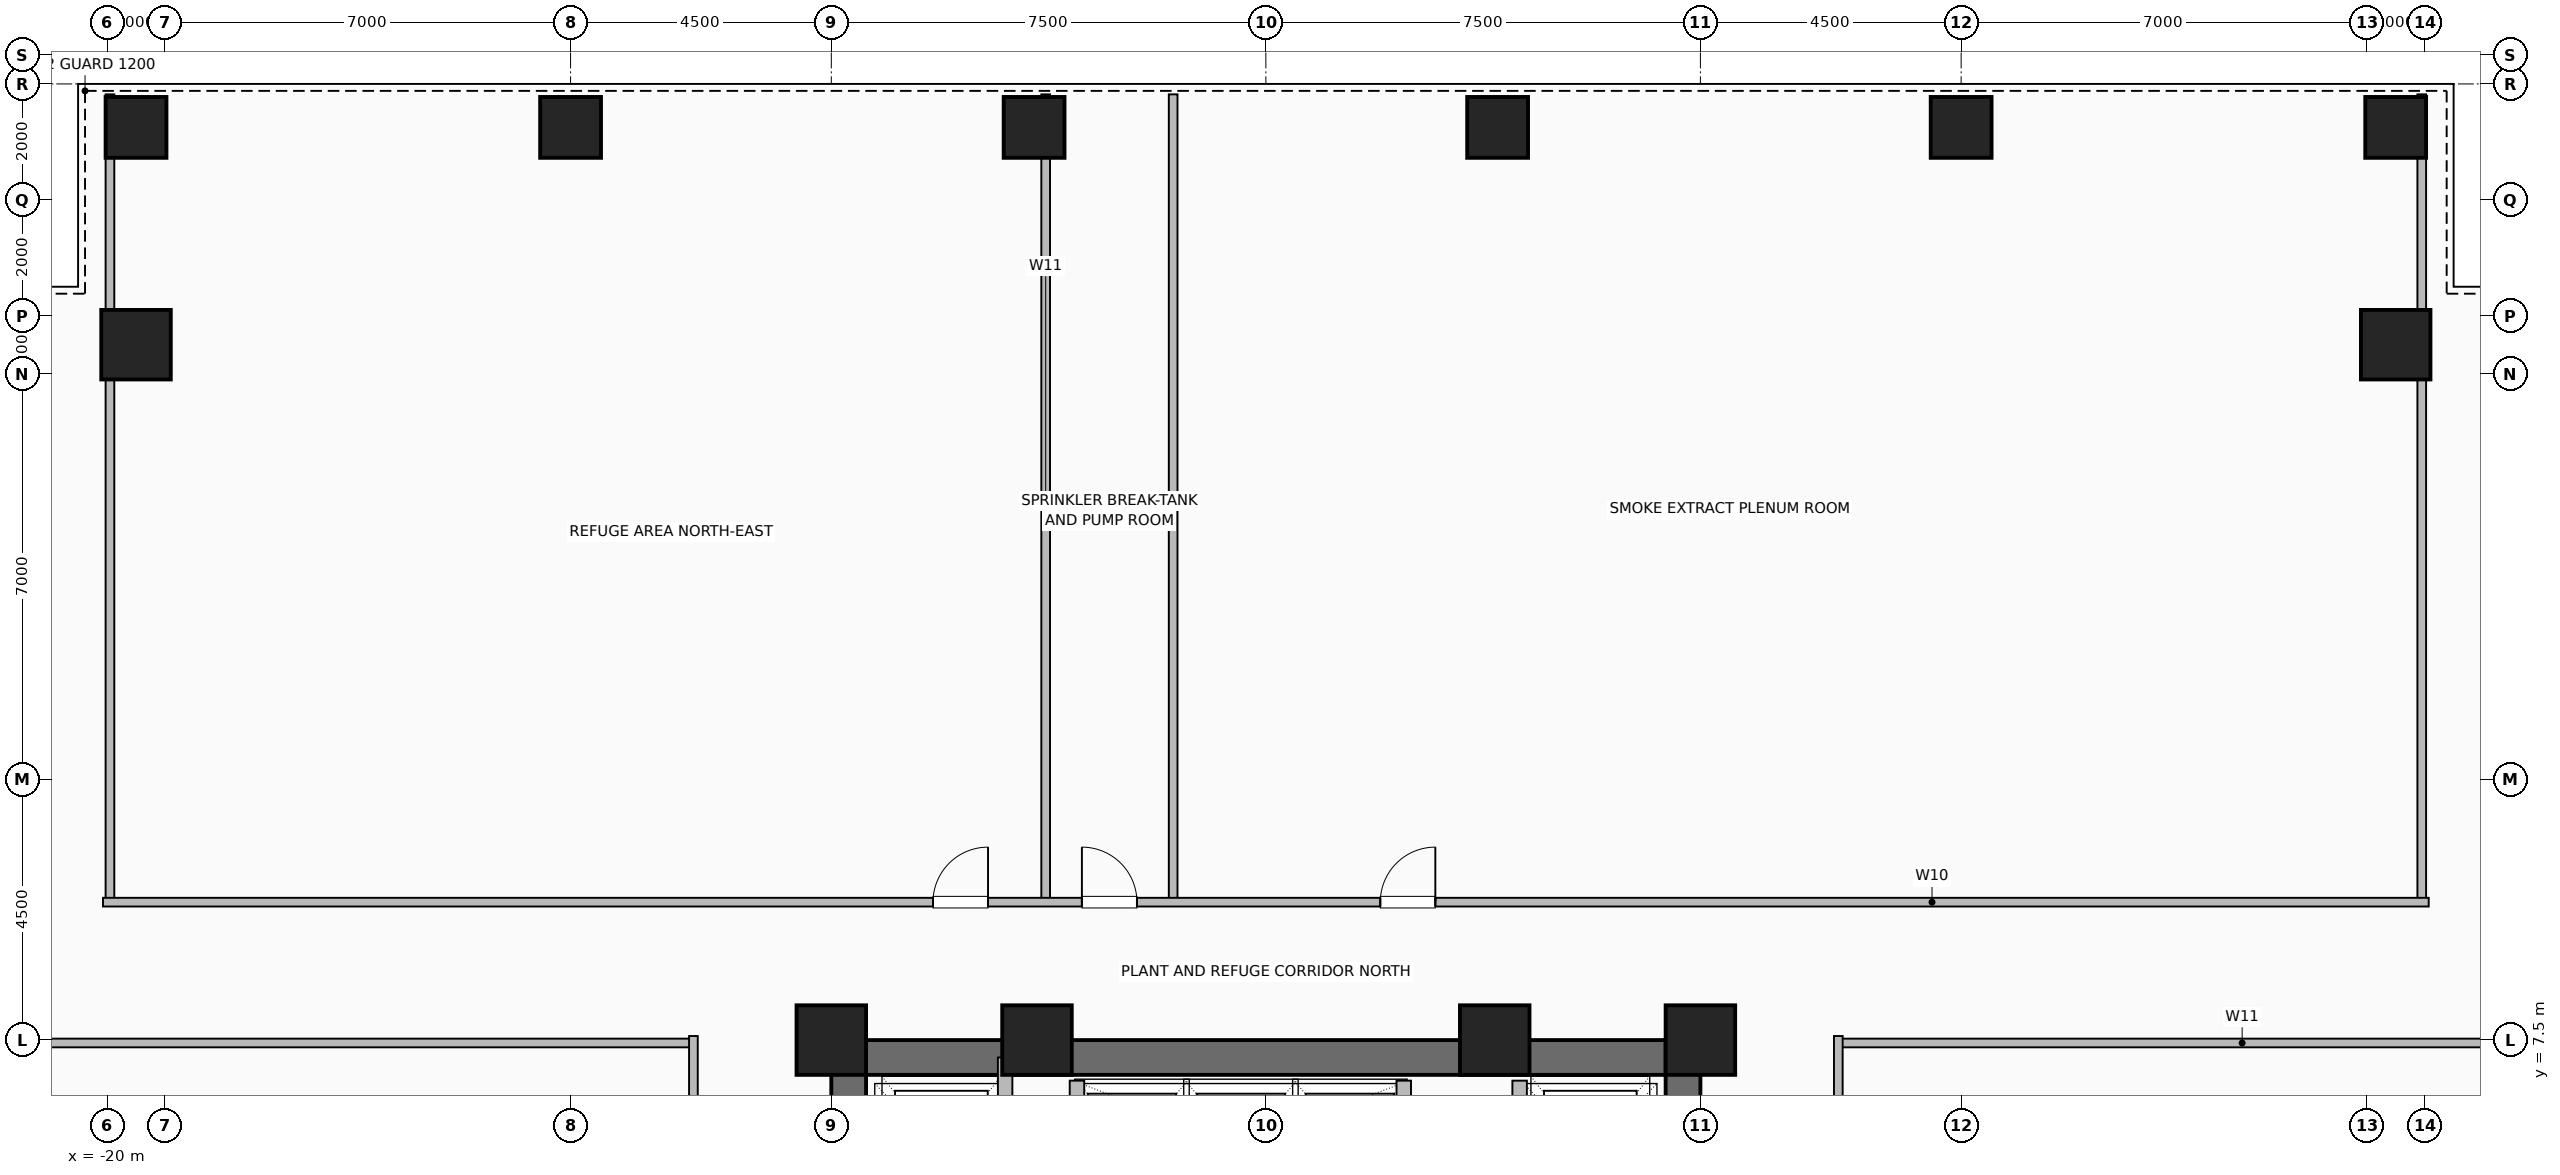
"""IFC4 building model, lengths in metres.
Left out: names, types, materials, properties, quantities, classifications, styles, units other than length and angle.
Written with IfcOpenShell. Run it as: python <this file> out.ifc"""

import sys

from ifc_helpers import new_model, si_unit, direction, frame, frame_2d, origin, origin_2d, place, context, subcontext, project, spatial, rectangle, hollow_rectangle, extrude, element, fill, save


model = new_model("IFC4")
c1 = context("Model", 3, precision=1e-05, world=origin(), true_north=direction((0.0, 1.0)))
c2 = subcontext(c1, "Body", "Model", "MODEL_VIEW")
j1 = project(units=[si_unit("LENGTHUNIT", "METRE"), si_unit("PLANEANGLEUNIT", "RADIAN")], contexts=[c1])
p1 = place(None, origin())
s1 = spatial("IfcSite", under=j1, at=p1, CompositionType="ELEMENT")
p2 = place(p1, origin())
s2 = spatial("IfcBuilding", under=s1, at=p2, CompositionType="ELEMENT")
p3 = place(p2, frame((0.0, 0.0, 88.0)))
s3 = spatial("IfcBuildingStorey", under=s2, at=p3, CompositionType="ELEMENT", Elevation=88.0)
for number, where, z_axis, x_axis in (
    (1, (7.5, 7.5, 0.0), (0.0, 0.0, 1.0), (1.0, 0.0, 0.0)),
    (2, (3.95, 7.5, 0.0), (0.0, 0.0, 1.0), (1.0, 0.0, 0.0)),
    (3, (-3.95, 7.5, 0.0), (0.0, 0.0, 1.0), (1.0, 0.0, 0.0)),
    (4, (-7.5, 7.5, 0.0), (0.0, 0.0, 1.0), (1.0, 0.0, 0.0)),
):
    element("IfcColumn", number, at=place(p3, frame(where, z_axis=z_axis, x_axis=x_axis)), inside=s3, PredefinedType="COLUMN", context=c2, shape_type="SweptSolid", body=[
        extrude(hollow_rectangle(XDim=1.2, YDim=1.2, WallThickness=0.055, at=origin_2d()), origin(), (0.0, 0.0, 1.0), 6.0),
    ])
for number, where, z_axis, x_axis in (
    (5, (-19.5, 23.25, 0.0), (0.0, 0.0, 1.0), (1.0, 0.0, 0.0)),
    (6, (-12.0, 23.25, 0.0), (0.0, 0.0, 1.0), (1.0, 0.0, 0.0)),
    (7, (-4.0, 23.25, 0.0), (0.0, 0.0, 1.0), (1.0, 0.0, 0.0)),
    (8, (4.0, 23.25, 0.0), (0.0, 0.0, 1.0), (1.0, 0.0, 0.0)),
    (9, (12.0, 23.25, 0.0), (0.0, 0.0, 1.0), (1.0, 0.0, 0.0)),
    (10, (19.5, 23.25, 0.0), (0.0, 0.0, 1.0), (1.0, 0.0, 0.0)),
):
    element("IfcColumn", number, at=place(p3, frame(where, z_axis=z_axis, x_axis=x_axis)), inside=s3, PredefinedType="COLUMN", context=c2, shape_type="SweptSolid", body=[
        extrude(hollow_rectangle(XDim=1.05, YDim=1.05, WallThickness=0.05, at=origin_2d()), origin(), (0.0, 0.0, 1.0), 5.6),
    ])
for number, where, z_axis, x_axis in (
    (11, (19.5, 19.5, 0.0), (0.0, 0.0, 1.0), (1.0, 0.0, 0.0)),
    (12, (-19.5, 19.5, 0.0), (0.0, 0.0, 1.0), (1.0, 0.0, 0.0)),
):
    element("IfcColumn", number, at=place(p3, frame(where, z_axis=z_axis, x_axis=x_axis)), inside=s3, PredefinedType="COLUMN", context=c2, shape_type="SweptSolid", body=[
        extrude(hollow_rectangle(XDim=1.2, YDim=1.2, WallThickness=0.055, at=origin_2d()), origin(), (0.0, 0.0, 1.0), 5.6),
    ])
p4 = place(p3, frame((-7.5, 7.2, 0.0), z_axis=(0.0, 0.0, 1.0), x_axis=(1.0, 0.0, 0.0)))
e13 = element("IfcWall", 13, at=p4, inside=s3, PredefinedType="SHEAR", context=c2, shape_type="SweptSolid", body=[
    extrude(rectangle(XDim=15.0, YDim=0.6, at=frame_2d((7.5, 0.0))), origin(), (0.0, 0.0, 1.0), 5.6),
])
p5 = place(p3, frame((-7.2, -7.5, 0.0), z_axis=(0.0, 0.0, 1.0), x_axis=(0.0, 1.0, 0.0)))
e14 = element("IfcWall", 14, at=p5, inside=s3, PredefinedType="SHEAR", context=c2, shape_type="SweptSolid", body=[
    extrude(rectangle(XDim=15.0, YDim=0.6, at=frame_2d((7.5, 0.0))), origin(), (0.0, 0.0, 1.0), 5.6),
])
p6 = place(p5, frame((9.5, 0.0, 0.0)))
e15 = element("IfcOpeningElement", 15, at=p6, cuts=e14, PredefinedType="OPENING", context=c2, shape_type="SweptSolid", body=[
    extrude(rectangle(XDim=1.0, YDim=2.08, at=frame_2d((0.5, 1.04))), frame((0.0, 0.31, 0.0), z_axis=(0.0, -1.0, 0.0), x_axis=(1.0, 0.0, 0.0)), (0.0, 0.0, 1.0), 0.62),
])
p7 = place(p3, frame((7.2, -7.5, 0.0), z_axis=(0.0, 0.0, 1.0), x_axis=(0.0, 1.0, 0.0)))
e16 = element("IfcWall", 16, at=p7, inside=s3, PredefinedType="SHEAR", context=c2, shape_type="SweptSolid", body=[
    extrude(rectangle(XDim=15.0, YDim=0.6, at=frame_2d((7.5, 0.0))), origin(), (0.0, 0.0, 1.0), 5.6),
])
for number, where, z_axis, x_axis in (
    (17, (-3.26, 4.58, 0.0), (0.0, 0.0, 1.0), (0.0, 1.0, 0.0)),
    (18, (2.38, 4.58, 0.0), (0.0, 0.0, 1.0), (0.0, 1.0, 0.0)),
):
    element("IfcWall", number, at=place(p3, frame(where, z_axis=z_axis, x_axis=x_axis)), inside=s3, PredefinedType="SHEAR", context=c2, shape_type="SweptSolid", body=[
        extrude(rectangle(XDim=2.22, YDim=0.25, at=frame_2d((1.11, 0.0))), origin(), (0.0, 0.0, 1.0), 5.6),
    ])
p8 = place(p3, frame((-4.5, 4.35, 0.0), z_axis=(0.0, 0.0, 1.0), x_axis=(0.0, 1.0, 0.0)))
e19 = element("IfcWall", 19, at=p8, inside=s3, PredefinedType="SHEAR", context=c2, shape_type="SweptSolid", body=[
    extrude(rectangle(XDim=2.85, YDim=0.25, at=frame_2d((1.425, 0.0))), origin(), (0.0, 0.0, 1.0), 5.6),
])
p9 = place(p3, frame((4.38, 4.3, 0.0), z_axis=(0.0, 0.0, 1.0), x_axis=(0.0, 1.0, 0.0)))
e20 = element("IfcWall", 20, at=p9, inside=s3, PredefinedType="SHEAR", context=c2, shape_type="SweptSolid", body=[
    extrude(rectangle(XDim=2.5, YDim=0.25, at=frame_2d((1.25, 0.0))), origin(), (0.0, 0.0, 1.0), 5.6),
])
p10 = place(p9, frame((0.8, 0.0, 0.0)))
e21 = element("IfcOpeningElement", 21, at=p10, cuts=e20, PredefinedType="OPENING", context=c2, shape_type="SweptSolid", body=[
    extrude(rectangle(XDim=1.2, YDim=2.2, at=frame_2d((0.6, 1.1))), frame((0.0, 0.135, 0.0), z_axis=(0.0, -1.0, 0.0), x_axis=(1.0, 0.0, 0.0)), (0.0, 0.0, 1.0), 0.27),
])
p11 = place(p3, frame((-19.95, 9.88, 0.0), z_axis=(0.0, 0.0, 1.0), x_axis=(0.0, 1.0, 0.0)))
e22 = element("IfcWall", 22, at=p11, inside=s3, PredefinedType="PARTITIONING", context=c2, shape_type="SweptSolid", body=[
    extrude(rectangle(XDim=13.94, YDim=0.15, at=frame_2d((6.97, 0.0))), origin(), (0.0, 0.0, 1.0), 5.6),
])
p12 = place(p3, frame((-3.8, 9.88, 0.0), z_axis=(0.0, 0.0, 1.0), x_axis=(0.0, 1.0, 0.0)))
e23 = element("IfcWall", 23, at=p12, inside=s3, PredefinedType="PARTITIONING", context=c2, shape_type="SweptSolid", body=[
    extrude(rectangle(XDim=13.94, YDim=0.15, at=frame_2d((6.97, 0.0))), origin(), (0.0, 0.0, 1.0), 3.975),
])
for number, where, z_axis, x_axis in (
    (24, (-1.6, 9.88, 0.0), (0.0, 0.0, 1.0), (0.0, 1.0, 0.0)),
    (25, (19.95, 9.88, 0.0), (0.0, 0.0, 1.0), (0.0, 1.0, 0.0)),
):
    element("IfcWall", number, at=place(p3, frame(where, z_axis=z_axis, x_axis=x_axis)), inside=s3, PredefinedType="PARTITIONING", context=c2, shape_type="SweptSolid", body=[
        extrude(rectangle(XDim=13.94, YDim=0.15, at=frame_2d((6.97, 0.0))), origin(), (0.0, 0.0, 1.0), 5.6),
    ])
p13 = place(p3, frame((-20.07, 9.88, 0.0), z_axis=(0.0, 0.0, 1.0), x_axis=(1.0, 0.0, 0.0)))
e26 = element("IfcWall", 26, at=p13, inside=s3, PredefinedType="PARTITIONING", context=c2, shape_type="SweptSolid", body=[
    extrude(rectangle(XDim=40.14, YDim=0.15, at=frame_2d((20.07, 0.0))), origin(), (0.0, 0.0, 1.0), 3.975),
])
p14 = place(p13, frame((14.325, 0.0, 0.0)))
e27 = element("IfcOpeningElement", 27, at=p14, cuts=e26, PredefinedType="OPENING", context=c2, shape_type="SweptSolid", body=[
    extrude(rectangle(XDim=0.95, YDim=2.06, at=frame_2d((0.475, 1.03))), frame((0.0, 0.085, 0.0), z_axis=(0.0, -1.0, 0.0), x_axis=(1.0, 0.0, 0.0)), (0.0, 0.0, 1.0), 0.17),
])
p15 = place(p13, frame((16.895, 0.0, 0.0)))
e28 = element("IfcOpeningElement", 28, at=p15, cuts=e26, PredefinedType="OPENING", context=c2, shape_type="SweptSolid", body=[
    extrude(rectangle(XDim=0.95, YDim=2.06, at=frame_2d((0.475, 1.03))), frame((0.0, 0.085, 0.0), z_axis=(0.0, -1.0, 0.0), x_axis=(1.0, 0.0, 0.0)), (0.0, 0.0, 1.0), 0.17),
])
p16 = place(p13, frame((22.045, 0.0, 0.0)))
e29 = element("IfcOpeningElement", 29, at=p16, cuts=e26, PredefinedType="OPENING", context=c2, shape_type="SweptSolid", body=[
    extrude(rectangle(XDim=0.95, YDim=2.06, at=frame_2d((0.475, 1.03))), frame((0.0, 0.085, 0.0), z_axis=(0.0, -1.0, 0.0), x_axis=(1.0, 0.0, 0.0)), (0.0, 0.0, 1.0), 0.17),
])
p17 = place(p3, frame((-23.82, 7.45, 0.0), z_axis=(0.0, 0.0, 1.0), x_axis=(1.0, 0.0, 0.0)))
e30 = element("IfcWall", 30, at=p17, inside=s3, PredefinedType="PARTITIONING", context=c2, shape_type="SweptSolid", body=[
    extrude(rectangle(XDim=13.94, YDim=0.15, at=frame_2d((6.97, 0.0))), origin(), (0.0, 0.0, 1.0), 3.975),
])
p18 = place(p3, frame((-9.88, -7.57, 0.0), z_axis=(0.0, 0.0, 1.0), x_axis=(0.0, 1.0, 0.0)))
e31 = element("IfcWall", 31, at=p18, inside=s3, PredefinedType="PARTITIONING", context=c2, shape_type="SweptSolid", body=[
    extrude(rectangle(XDim=15.14, YDim=0.15, at=frame_2d((7.57, 0.0))), origin(), (0.0, 0.0, 1.0), 5.6),
])
p19 = place(p18, frame((4.17, 0.0, 0.0)))
e32 = element("IfcOpeningElement", 32, at=p19, cuts=e31, PredefinedType="OPENING", context=c2, shape_type="SweptSolid", body=[
    extrude(rectangle(XDim=0.95, YDim=2.06, at=frame_2d((0.475, 1.03))), frame((0.0, 0.085, 0.0), z_axis=(0.0, -1.0, 0.0), x_axis=(1.0, 0.0, 0.0)), (0.0, 0.0, 1.0), 0.17),
])
p20 = place(p18, frame((11.62, 0.0, 0.0)))
e33 = element("IfcOpeningElement", 33, at=p20, cuts=e31, PredefinedType="OPENING", context=c2, shape_type="SweptSolid", body=[
    extrude(rectangle(XDim=0.95, YDim=2.06, at=frame_2d((0.475, 1.03))), frame((0.0, 0.085, 0.0), z_axis=(0.0, -1.0, 0.0), x_axis=(1.0, 0.0, 0.0)), (0.0, 0.0, 1.0), 0.17),
])
p21 = place(p3, frame((9.88, 7.45, 0.0), z_axis=(0.0, 0.0, 1.0), x_axis=(1.0, 0.0, 0.0)))
e34 = element("IfcWall", 34, at=p21, inside=s3, PredefinedType="PARTITIONING", context=c2, shape_type="SweptSolid", body=[
    extrude(rectangle(XDim=13.94, YDim=0.15, at=frame_2d((6.97, 0.0))), origin(), (0.0, 0.0, 1.0), 3.975),
])
p22 = place(p3, frame((9.88, -7.57, 0.0), z_axis=(0.0, 0.0, 1.0), x_axis=(0.0, 1.0, 0.0)))
e35 = element("IfcWall", 35, at=p22, inside=s3, PredefinedType="PARTITIONING", context=c2, shape_type="SweptSolid", body=[
    extrude(rectangle(XDim=15.14, YDim=0.15, at=frame_2d((7.57, 0.0))), origin(), (0.0, 0.0, 1.0), 5.6),
])
p23 = place(p22, frame((4.17, 0.0, 0.0)))
e36 = element("IfcOpeningElement", 36, at=p23, cuts=e35, PredefinedType="OPENING", context=c2, shape_type="SweptSolid", body=[
    extrude(rectangle(XDim=0.95, YDim=2.06, at=frame_2d((0.475, 1.03))), frame((0.0, 0.085, 0.0), z_axis=(0.0, -1.0, 0.0), x_axis=(1.0, 0.0, 0.0)), (0.0, 0.0, 1.0), 0.17),
])
p24 = place(p22, frame((11.62, 0.0, 0.0)))
e37 = element("IfcOpeningElement", 37, at=p24, cuts=e35, PredefinedType="OPENING", context=c2, shape_type="SweptSolid", body=[
    extrude(rectangle(XDim=0.95, YDim=2.06, at=frame_2d((0.475, 1.03))), frame((0.0, 0.085, 0.0), z_axis=(0.0, -1.0, 0.0), x_axis=(1.0, 0.0, 0.0)), (0.0, 0.0, 1.0), 0.17),
])
p25 = place(p14, origin())
e38 = element("IfcDoor", 38, at=p25, inside=s3, OperationType="SINGLE_SWING_RIGHT", PredefinedType="DOOR", context=c2, shape_type="SweptSolid", body=[
    extrude(rectangle(XDim=0.95, YDim=2.06, at=frame_2d((0.475, 1.03))), frame((0.0, 0.025, 0.0), z_axis=(0.0, -1.0, 0.0), x_axis=(1.0, 0.0, 0.0)), (0.0, 0.0, 1.0), 0.05),
])
fill(e27, e38)
p26 = place(p15, origin())
e39 = element("IfcDoor", 39, at=p26, inside=s3, OperationType="SINGLE_SWING_LEFT", PredefinedType="DOOR", context=c2, shape_type="SweptSolid", body=[
    extrude(rectangle(XDim=0.95, YDim=2.06, at=frame_2d((0.475, 1.03))), frame((0.0, 0.025, 0.0), z_axis=(0.0, -1.0, 0.0), x_axis=(1.0, 0.0, 0.0)), (0.0, 0.0, 1.0), 0.05),
])
fill(e28, e39)
p27 = place(p16, origin())
e40 = element("IfcDoor", 40, at=p27, inside=s3, OperationType="SINGLE_SWING_RIGHT", PredefinedType="DOOR", context=c2, shape_type="SweptSolid", body=[
    extrude(rectangle(XDim=0.95, YDim=2.06, at=frame_2d((0.475, 1.03))), frame((0.0, 0.025, 0.0), z_axis=(0.0, -1.0, 0.0), x_axis=(1.0, 0.0, 0.0)), (0.0, 0.0, 1.0), 0.05),
])
fill(e29, e40)
save(model, sys.argv[1])
